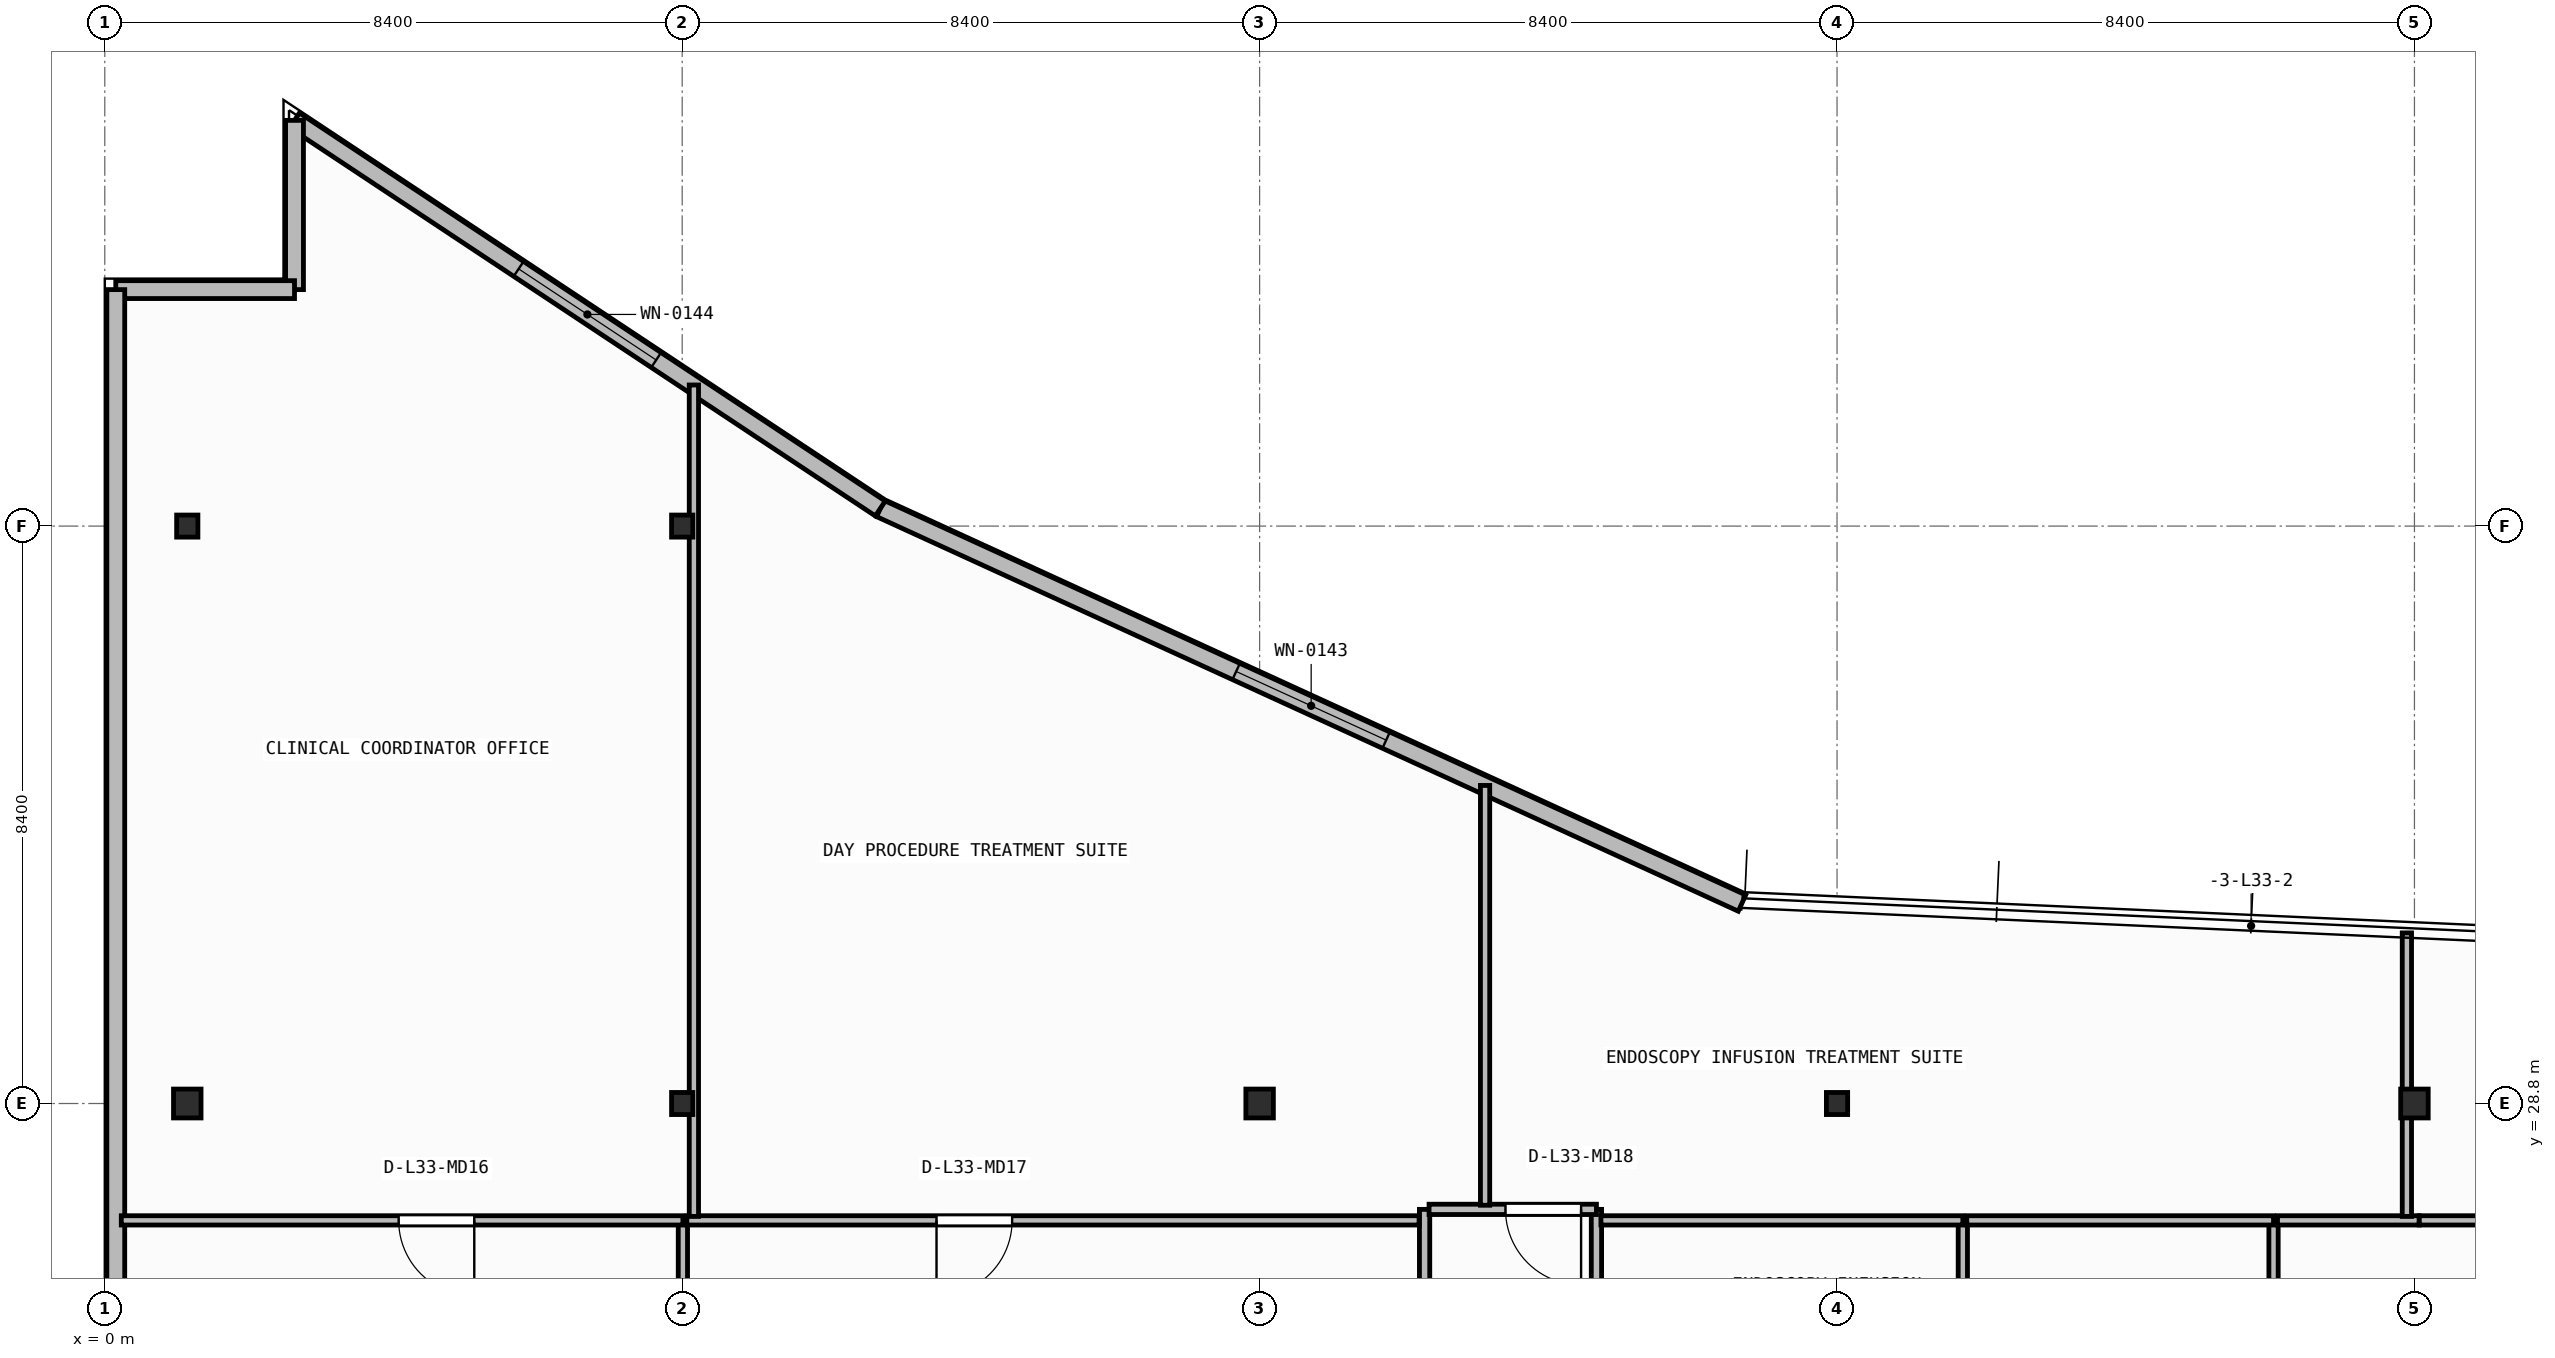
"""IFC4 building model, lengths in metres.
Left out: names, types, materials, properties, quantities, classifications, styles, units other than length and angle.
Written with IfcOpenShell. Run it as: python <this file> out.ifc"""

import sys

from ifc_helpers import new_model, si_unit, direction, frame, frame_2d, origin, origin_2d, place, context, subcontext, project, spatial, rectangle, i_section, extrude, element, fill, save


model = new_model("IFC4")
c1 = context("Model", 3, precision=1e-05, world=origin(), true_north=direction((0.0, 1.0)))
c2 = subcontext(c1, "Body", "Model", "MODEL_VIEW")
j1 = project(units=[si_unit("LENGTHUNIT", "METRE"), si_unit("PLANEANGLEUNIT", "RADIAN")], contexts=[c1])
p1 = place(None, origin())
s1 = spatial("IfcSite", under=j1, at=p1, CompositionType="ELEMENT")
p2 = place(p1, origin())
s2 = spatial("IfcBuilding", under=s1, at=p2, CompositionType="ELEMENT")
p3 = place(p2, frame((0.0, 0.0, 134.95)))
s3 = spatial("IfcBuildingStorey", under=s2, at=p3, CompositionType="ELEMENT", Elevation=134.95)
p4 = place(p3, frame((1.2, 28.8, 0.0), z_axis=(0.0, 0.0, 1.0), x_axis=(1.0, 0.0, 0.0)))
e1 = element("IfcColumn", 1, at=p4, inside=s3, PredefinedType="COLUMN", context=c2, shape_type="SweptSolid", body=[
    extrude(i_section(OverallWidth=0.4, OverallDepth=0.42, WebThickness=0.025, FlangeThickness=0.04, at=origin_2d()), origin(), (0.0, 0.0, 1.0), 3.95),
])
p5 = place(p3, frame((8.4, 28.8, 0.0), z_axis=(0.0, 0.0, 1.0), x_axis=(1.0, 0.0, 0.0)))
e2 = element("IfcColumn", 2, at=p5, inside=s3, PredefinedType="COLUMN", context=c2, shape_type="SweptSolid", body=[
    extrude(i_section(OverallWidth=0.309, OverallDepth=0.321, WebThickness=0.014, FlangeThickness=0.022, FilletRadius=0.017, at=origin_2d()), origin(), (0.0, 0.0, 1.0), 3.95),
])
p6 = place(p3, frame((16.8, 28.8, 0.0), z_axis=(0.0, 0.0, 1.0), x_axis=(1.0, 0.0, 0.0)))
e3 = element("IfcColumn", 3, at=p6, inside=s3, PredefinedType="COLUMN", context=c2, shape_type="SweptSolid", body=[
    extrude(i_section(OverallWidth=0.4, OverallDepth=0.42, WebThickness=0.025, FlangeThickness=0.04, at=origin_2d()), origin(), (0.0, 0.0, 1.0), 3.95),
])
p7 = place(p3, frame((25.2, 28.8, 0.0), z_axis=(0.0, 0.0, 1.0), x_axis=(1.0, 0.0, 0.0)))
e4 = element("IfcColumn", 4, at=p7, inside=s3, PredefinedType="COLUMN", context=c2, shape_type="SweptSolid", body=[
    extrude(i_section(OverallWidth=0.309, OverallDepth=0.321, WebThickness=0.014, FlangeThickness=0.022, FilletRadius=0.017, at=origin_2d()), origin(), (0.0, 0.0, 1.0), 3.95),
])
p8 = place(p3, frame((33.6, 28.8, 0.0), z_axis=(0.0, 0.0, 1.0), x_axis=(1.0, 0.0, 0.0)))
e5 = element("IfcColumn", 5, at=p8, inside=s3, PredefinedType="COLUMN", context=c2, shape_type="SweptSolid", body=[
    extrude(i_section(OverallWidth=0.4, OverallDepth=0.42, WebThickness=0.025, FlangeThickness=0.04, at=origin_2d()), origin(), (0.0, 0.0, 1.0), 3.95),
])
for number, where, z_axis, x_axis in (
    (6, (1.2, 37.2, 0.0), (0.0, 0.0, 1.0), (1.0, 0.0, 0.0)),
    (7, (8.4, 37.2, 0.0), (0.0, 0.0, 1.0), (1.0, 0.0, 0.0)),
):
    element("IfcColumn", number, at=place(p3, frame(where, z_axis=z_axis, x_axis=x_axis)), inside=s3, PredefinedType="COLUMN", context=c2, shape_type="SweptSolid", body=[
        extrude(i_section(OverallWidth=0.309, OverallDepth=0.321, WebThickness=0.014, FlangeThickness=0.022, FilletRadius=0.017, at=origin_2d()), origin(), (0.0, 0.0, 1.0), 3.95),
    ])
p9 = place(p3, frame((23.818, 31.716, 0.0), z_axis=(0.0, 0.0, 1.0), x_axis=(-0.909209527513, 0.416338846471, 0.0)))
e8 = element("IfcWall", 8, at=p9, inside=s3, PredefinedType="STANDARD", context=c2, shape_type="SweptSolid", body=[
    extrude(rectangle(XDim=13.787, YDim=0.26, at=frame_2d((6.894, 0.0))), origin(), (0.0, 0.0, 1.0), 3.71),
])
p10 = place(p9, frame((5.694, 0.0, 0.9)))
e9 = element("IfcOpeningElement", 9, at=p10, cuts=e8, PredefinedType="OPENING", context=c2, shape_type="SweptSolid", body=[
    extrude(rectangle(XDim=2.4, YDim=1.65, at=frame_2d((1.2, 0.825))), frame((0.0, 0.14, 0.0), z_axis=(0.0, -1.0, 0.0), x_axis=(1.0, 0.0, 0.0)), (0.0, 0.0, 1.0), 0.28),
])
p11 = place(p3, frame((11.282, 37.456, 0.0), z_axis=(0.0, 0.0, 1.0), x_axis=(-0.833630474253, 0.552322580017, 0.0)))
e10 = element("IfcWall", 10, at=p11, inside=s3, PredefinedType="STANDARD", context=c2, shape_type="SweptSolid", body=[
    extrude(rectangle(XDim=10.223, YDim=0.26, at=frame_2d((5.111, 0.0))), origin(), (0.0, 0.0, 1.0), 3.71),
])
p12 = place(p11, frame((3.911, 0.0, 0.9)))
e11 = element("IfcOpeningElement", 11, at=p12, cuts=e10, PredefinedType="OPENING", context=c2, shape_type="SweptSolid", body=[
    extrude(rectangle(XDim=2.4, YDim=1.65, at=frame_2d((1.2, 0.825))), frame((0.0, 0.14, 0.0), z_axis=(0.0, -1.0, 0.0), x_axis=(1.0, 0.0, 0.0)), (0.0, 0.0, 1.0), 0.28),
])
p13 = place(p3, frame((2.76, 43.102, 0.0), z_axis=(0.0, 0.0, 1.0), x_axis=(0.0, -1.0, 0.0)))
e12 = element("IfcWall", 12, at=p13, inside=s3, PredefinedType="STANDARD", context=c2, shape_type="SweptSolid", body=[
    extrude(rectangle(XDim=2.462, YDim=0.26, at=frame_2d((1.231, 0.0))), origin(), (0.0, 0.0, 1.0), 3.71),
])
p14 = place(p3, frame((2.76, 40.64, 0.0), z_axis=(0.0, 0.0, 1.0), x_axis=(-1.0, 0.0, 0.0)))
e13 = element("IfcWall", 13, at=p14, inside=s3, PredefinedType="STANDARD", context=c2, shape_type="SweptSolid", body=[
    extrude(rectangle(XDim=2.6, YDim=0.26, at=frame_2d((1.3, 0.0))), origin(), (0.0, 0.0, 1.0), 3.71),
])
p15 = place(p3, frame((0.16, 40.64, 0.0), z_axis=(0.0, 0.0, 1.0), x_axis=(0.0, -1.0, 0.0)))
e14 = element("IfcWall", 14, at=p15, inside=s3, PredefinedType="STANDARD", context=c2, shape_type="SweptSolid", body=[
    extrude(rectangle(XDim=37.88, YDim=0.26, at=frame_2d((18.94, 0.0))), origin(), (0.0, 0.0, 1.0), 3.71),
])
p16 = place(p15, frame((27.795, 0.0, 0.9)))
e15 = element("IfcOpeningElement", 15, at=p16, cuts=e14, PredefinedType="OPENING", context=c2, shape_type="SweptSolid", body=[
    extrude(rectangle(XDim=2.4, YDim=1.65, at=frame_2d((1.2, 0.825))), frame((0.0, 0.14, 0.0), z_axis=(0.0, -1.0, 0.0), x_axis=(1.0, 0.0, 0.0)), (0.0, 0.0, 1.0), 0.28),
])
p17 = place(p3, frame((19.2, 27.26, 0.0), z_axis=(0.0, 0.0, 1.0), x_axis=(0.0, -1.0, 0.0)))
e16 = element("IfcWall", 16, at=p17, inside=s3, PredefinedType="PARTITIONING", context=c2, shape_type="SweptSolid", body=[
    extrude(rectangle(XDim=6.482, YDim=0.15, at=frame_2d((3.241, 0.0))), origin(), (0.0, 0.0, 1.0), 3.71),
])
p18 = place(p17, frame((2.068, 0.0, 0.0)))
e17 = element("IfcOpeningElement", 17, at=p18, cuts=e16, PredefinedType="OPENING", context=c2, shape_type="SweptSolid", body=[
    extrude(rectangle(XDim=1.1, YDim=2.1, at=frame_2d((0.55, 1.05))), frame((0.0, 0.085, 0.0), z_axis=(0.0, -1.0, 0.0), x_axis=(1.0, 0.0, 0.0)), (0.0, 0.0, 1.0), 0.17),
])
p19 = place(p3, frame((21.7, 20.504, 0.0), z_axis=(0.0, 0.0, 1.0), x_axis=(0.0, 1.0, 0.0)))
e18 = element("IfcWall", 18, at=p19, inside=s3, PredefinedType="PARTITIONING", context=c2, shape_type="SweptSolid", body=[
    extrude(rectangle(XDim=6.756, YDim=0.15, at=frame_2d((3.378, 0.0))), origin(), (0.0, 0.0, 1.0), 3.71),
])
p20 = place(p19, frame((2.828, 0.0, 0.0)))
e19 = element("IfcOpeningElement", 19, at=p20, cuts=e18, PredefinedType="OPENING", context=c2, shape_type="SweptSolid", body=[
    extrude(rectangle(XDim=1.1, YDim=2.1, at=frame_2d((0.55, 1.05))), frame((0.0, 0.085, 0.0), z_axis=(0.0, -1.0, 0.0), x_axis=(1.0, 0.0, 0.0)), (0.0, 0.0, 1.0), 0.17),
])
p21 = place(p3, frame((21.7, 27.26, 0.0), z_axis=(0.0, 0.0, 1.0), x_axis=(-1.0, 0.0, 0.0)))
e20 = element("IfcWall", 20, at=p21, inside=s3, PredefinedType="PARTITIONING", context=c2, shape_type="SweptSolid", body=[
    extrude(rectangle(XDim=2.435, YDim=0.15, at=frame_2d((1.218, 0.0))), origin(), (0.0, 0.0, 1.0), 3.71),
])
p22 = place(p21, frame((0.223, 0.0, 0.0)))
e21 = element("IfcOpeningElement", 21, at=p22, cuts=e20, PredefinedType="OPENING", context=c2, shape_type="SweptSolid", body=[
    extrude(rectangle(XDim=1.1, YDim=2.1, at=frame_2d((0.55, 1.05))), frame((0.0, 0.085, 0.0), z_axis=(0.0, -1.0, 0.0), x_axis=(1.0, 0.0, 0.0)), (0.0, 0.0, 1.0), 0.17),
])
p23 = place(p3, frame((8.41, 20.607, 0.0), z_axis=(0.0, 0.0, 1.0), x_axis=(0.0, 1.0, 0.0)))
e22 = element("IfcWall", 22, at=p23, inside=s3, PredefinedType="PARTITIONING", context=c2, shape_type="SweptSolid", body=[
    extrude(rectangle(XDim=6.493, YDim=0.135, at=frame_2d((3.246, 0.0))), origin(), (0.0, 0.0, 1.0), 3.152),
])
p24 = place(p3, frame((8.41, 27.1, 0.0), z_axis=(0.0, 0.0, 1.0), x_axis=(-1.0, 0.0, 0.0)))
e23 = element("IfcWall", 23, at=p24, inside=s3, PredefinedType="PARTITIONING", context=c2, shape_type="SweptSolid", body=[
    extrude(rectangle(XDim=8.17, YDim=0.135, at=frame_2d((4.085, 0.0))), origin(), (0.0, 0.0, 1.0), 3.71),
])
p25 = place(p24, frame((3.035, 0.0, 0.0)))
e24 = element("IfcOpeningElement", 24, at=p25, cuts=e23, PredefinedType="OPENING", context=c2, shape_type="SweptSolid", body=[
    extrude(rectangle(XDim=1.1, YDim=2.1, at=frame_2d((0.55, 1.05))), frame((0.0, 0.077, 0.0), z_axis=(0.0, -1.0, 0.0), x_axis=(1.0, 0.0, 0.0)), (0.0, 0.0, 1.0), 0.155),
])
p26 = place(p3, frame((19.12, 27.1, 0.0), z_axis=(0.0, 0.0, 1.0), x_axis=(-1.0, 0.0, 0.0)))
e25 = element("IfcWall", 25, at=p26, inside=s3, PredefinedType="PARTITIONING", context=c2, shape_type="SweptSolid", body=[
    extrude(rectangle(XDim=10.653, YDim=0.135, at=frame_2d((5.326, 0.0))), origin(), (0.0, 0.0, 1.0), 3.71),
])
p27 = place(p26, frame((5.92, 0.0, 0.0)))
e26 = element("IfcOpeningElement", 26, at=p27, cuts=e25, PredefinedType="OPENING", context=c2, shape_type="SweptSolid", body=[
    extrude(rectangle(XDim=1.1, YDim=2.1, at=frame_2d((0.55, 1.05))), frame((0.0, 0.077, 0.0), z_axis=(0.0, -1.0, 0.0), x_axis=(1.0, 0.0, 0.0)), (0.0, 0.0, 1.0), 0.155),
])
p28 = place(p3, frame((27.03, 20.715, 0.0), z_axis=(0.0, 0.0, 1.0), x_axis=(0.0, 1.0, 0.0)))
e27 = element("IfcWall", 27, at=p28, inside=s3, PredefinedType="PARTITIONING", context=c2, shape_type="SweptSolid", body=[
    extrude(rectangle(XDim=6.385, YDim=0.135, at=frame_2d((3.192, 0.0))), origin(), (0.0, 0.0, 1.0), 3.71),
])
p29 = place(p3, frame((27.03, 27.1, 0.0), z_axis=(0.0, 0.0, 1.0), x_axis=(-1.0, 0.0, 0.0)))
e28 = element("IfcWall", 28, at=p29, inside=s3, PredefinedType="PARTITIONING", context=c2, shape_type="SweptSolid", body=[
    extrude(rectangle(XDim=5.265, YDim=0.135, at=frame_2d((2.633, 0.0))), origin(), (0.0, 0.0, 1.0), 3.71),
])
p30 = place(p3, frame((31.55, 20.715, 0.0), z_axis=(0.0, 0.0, 1.0), x_axis=(0.0, 1.0, 0.0)))
e29 = element("IfcWall", 29, at=p30, inside=s3, PredefinedType="PARTITIONING", context=c2, shape_type="SweptSolid", body=[
    extrude(rectangle(XDim=6.385, YDim=0.135, at=frame_2d((3.192, 0.0))), origin(), (0.0, 0.0, 1.0), 3.71),
])
p31 = place(p3, frame((31.55, 27.1, 0.0), z_axis=(0.0, 0.0, 1.0), x_axis=(-1.0, 0.0, 0.0)))
e30 = element("IfcWall", 30, at=p31, inside=s3, PredefinedType="PARTITIONING", context=c2, shape_type="SweptSolid", body=[
    extrude(rectangle(XDim=4.463, YDim=0.135, at=frame_2d((2.231, 0.0))), origin(), (0.0, 0.0, 1.0), 3.71),
])
p32 = place(p3, frame((33.668, 27.1, 0.0), z_axis=(0.0, 0.0, 1.0), x_axis=(-1.0, 0.0, 0.0)))
e31 = element("IfcWall", 31, at=p32, inside=s3, PredefinedType="PARTITIONING", context=c2, shape_type="SweptSolid", body=[
    extrude(rectangle(XDim=2.061, YDim=0.135, at=frame_2d((1.031, 0.0))), origin(), (0.0, 0.0, 1.0), 3.71),
])
p33 = place(p3, frame((36.46, 27.1, 0.0), z_axis=(0.0, 0.0, 1.0), x_axis=(-1.0, 0.0, 0.0)))
e32 = element("IfcWall", 32, at=p33, inside=s3, PredefinedType="PARTITIONING", context=c2, shape_type="SweptSolid", body=[
    extrude(rectangle(XDim=2.79, YDim=0.135, at=frame_2d((1.395, 0.0))), origin(), (0.0, 0.0, 1.0), 3.71),
])
p34 = place(p33, frame((0.232, 0.0, 0.0)))
e33 = element("IfcOpeningElement", 33, at=p34, cuts=e32, PredefinedType="OPENING", context=c2, shape_type="SweptSolid", body=[
    extrude(rectangle(XDim=1.1, YDim=2.1, at=frame_2d((0.55, 1.05))), frame((0.0, 0.077, 0.0), z_axis=(0.0, -1.0, 0.0), x_axis=(1.0, 0.0, 0.0)), (0.0, 0.0, 1.0), 0.155),
])
p35 = place(p3, frame((8.57, 27.157, 0.0), z_axis=(0.0, 0.0, 1.0), x_axis=(0.0, 1.0, 0.0)))
e34 = element("IfcWall", 34, at=p35, inside=s3, PredefinedType="PARTITIONING", context=c2, shape_type="SweptSolid", body=[
    extrude(rectangle(XDim=12.095, YDim=0.135, at=frame_2d((6.048, 0.0))), origin(), (0.0, 0.0, 1.0), 3.152),
])
p36 = place(p3, frame((20.08, 27.32, 0.0), z_axis=(0.0, 0.0, 1.0), x_axis=(0.0, 1.0, 0.0)))
e35 = element("IfcWall", 35, at=p36, inside=s3, PredefinedType="PARTITIONING", context=c2, shape_type="SweptSolid", body=[
    extrude(rectangle(XDim=6.107, YDim=0.135, at=frame_2d((3.053, 0.0))), origin(), (0.0, 0.0, 1.0), 3.71),
])
p37 = place(p3, frame((33.49, 27.157, 0.0), z_axis=(0.0, 0.0, 1.0), x_axis=(0.0, 1.0, 0.0)))
e36 = element("IfcWall", 36, at=p37, inside=s3, PredefinedType="PARTITIONING", context=c2, shape_type="SweptSolid", body=[
    extrude(rectangle(XDim=4.125, YDim=0.135, at=frame_2d((2.062, 0.0))), origin(), (0.0, 0.0, 1.0), 3.152),
])
p38 = place(p10, origin())
e37 = element("IfcWindow", 37, at=p38, inside=s3, PartitioningType="SINGLE_PANEL", PredefinedType="WINDOW", context=c2, shape_type="SweptSolid", body=[
    extrude(rectangle(XDim=2.4, YDim=1.65, at=frame_2d((1.2, 0.825))), frame((0.0, 0.03, 0.0), z_axis=(0.0, -1.0, 0.0), x_axis=(1.0, 0.0, 0.0)), (0.0, 0.0, 1.0), 0.06),
])
fill(e9, e37)
p39 = place(p12, origin())
e38 = element("IfcWindow", 38, at=p39, inside=s3, PartitioningType="SINGLE_PANEL", PredefinedType="WINDOW", context=c2, shape_type="SweptSolid", body=[
    extrude(rectangle(XDim=2.4, YDim=1.65, at=frame_2d((1.2, 0.825))), frame((0.0, 0.03, 0.0), z_axis=(0.0, -1.0, 0.0), x_axis=(1.0, 0.0, 0.0)), (0.0, 0.0, 1.0), 0.06),
])
fill(e11, e38)
p40 = place(p22, origin())
e39 = element("IfcDoor", 39, at=p40, inside=s3, OperationType="SINGLE_SWING_LEFT", PredefinedType="DOOR", context=c2, shape_type="SweptSolid", body=[
    extrude(rectangle(XDim=1.1, YDim=2.1, at=frame_2d((0.55, 1.05))), frame((0.0, 0.025, 0.0), z_axis=(0.0, -1.0, 0.0), x_axis=(1.0, 0.0, 0.0)), (0.0, 0.0, 1.0), 0.05),
])
fill(e21, e39)
p41 = place(p25, origin())
e40 = element("IfcDoor", 40, at=p41, inside=s3, OperationType="SINGLE_SWING_LEFT", PredefinedType="DOOR", context=c2, shape_type="SweptSolid", body=[
    extrude(rectangle(XDim=1.1, YDim=2.1, at=frame_2d((0.55, 1.05))), frame((0.0, 0.025, 0.0), z_axis=(0.0, -1.0, 0.0), x_axis=(1.0, 0.0, 0.0)), (0.0, 0.0, 1.0), 0.05),
])
fill(e24, e40)
p42 = place(p27, origin())
e41 = element("IfcDoor", 41, at=p42, inside=s3, OperationType="SINGLE_SWING_RIGHT", PredefinedType="DOOR", context=c2, shape_type="SweptSolid", body=[
    extrude(rectangle(XDim=1.1, YDim=2.1, at=frame_2d((0.55, 1.05))), frame((0.0, 0.025, 0.0), z_axis=(0.0, -1.0, 0.0), x_axis=(1.0, 0.0, 0.0)), (0.0, 0.0, 1.0), 0.05),
])
fill(e26, e41)
save(model, sys.argv[1])
